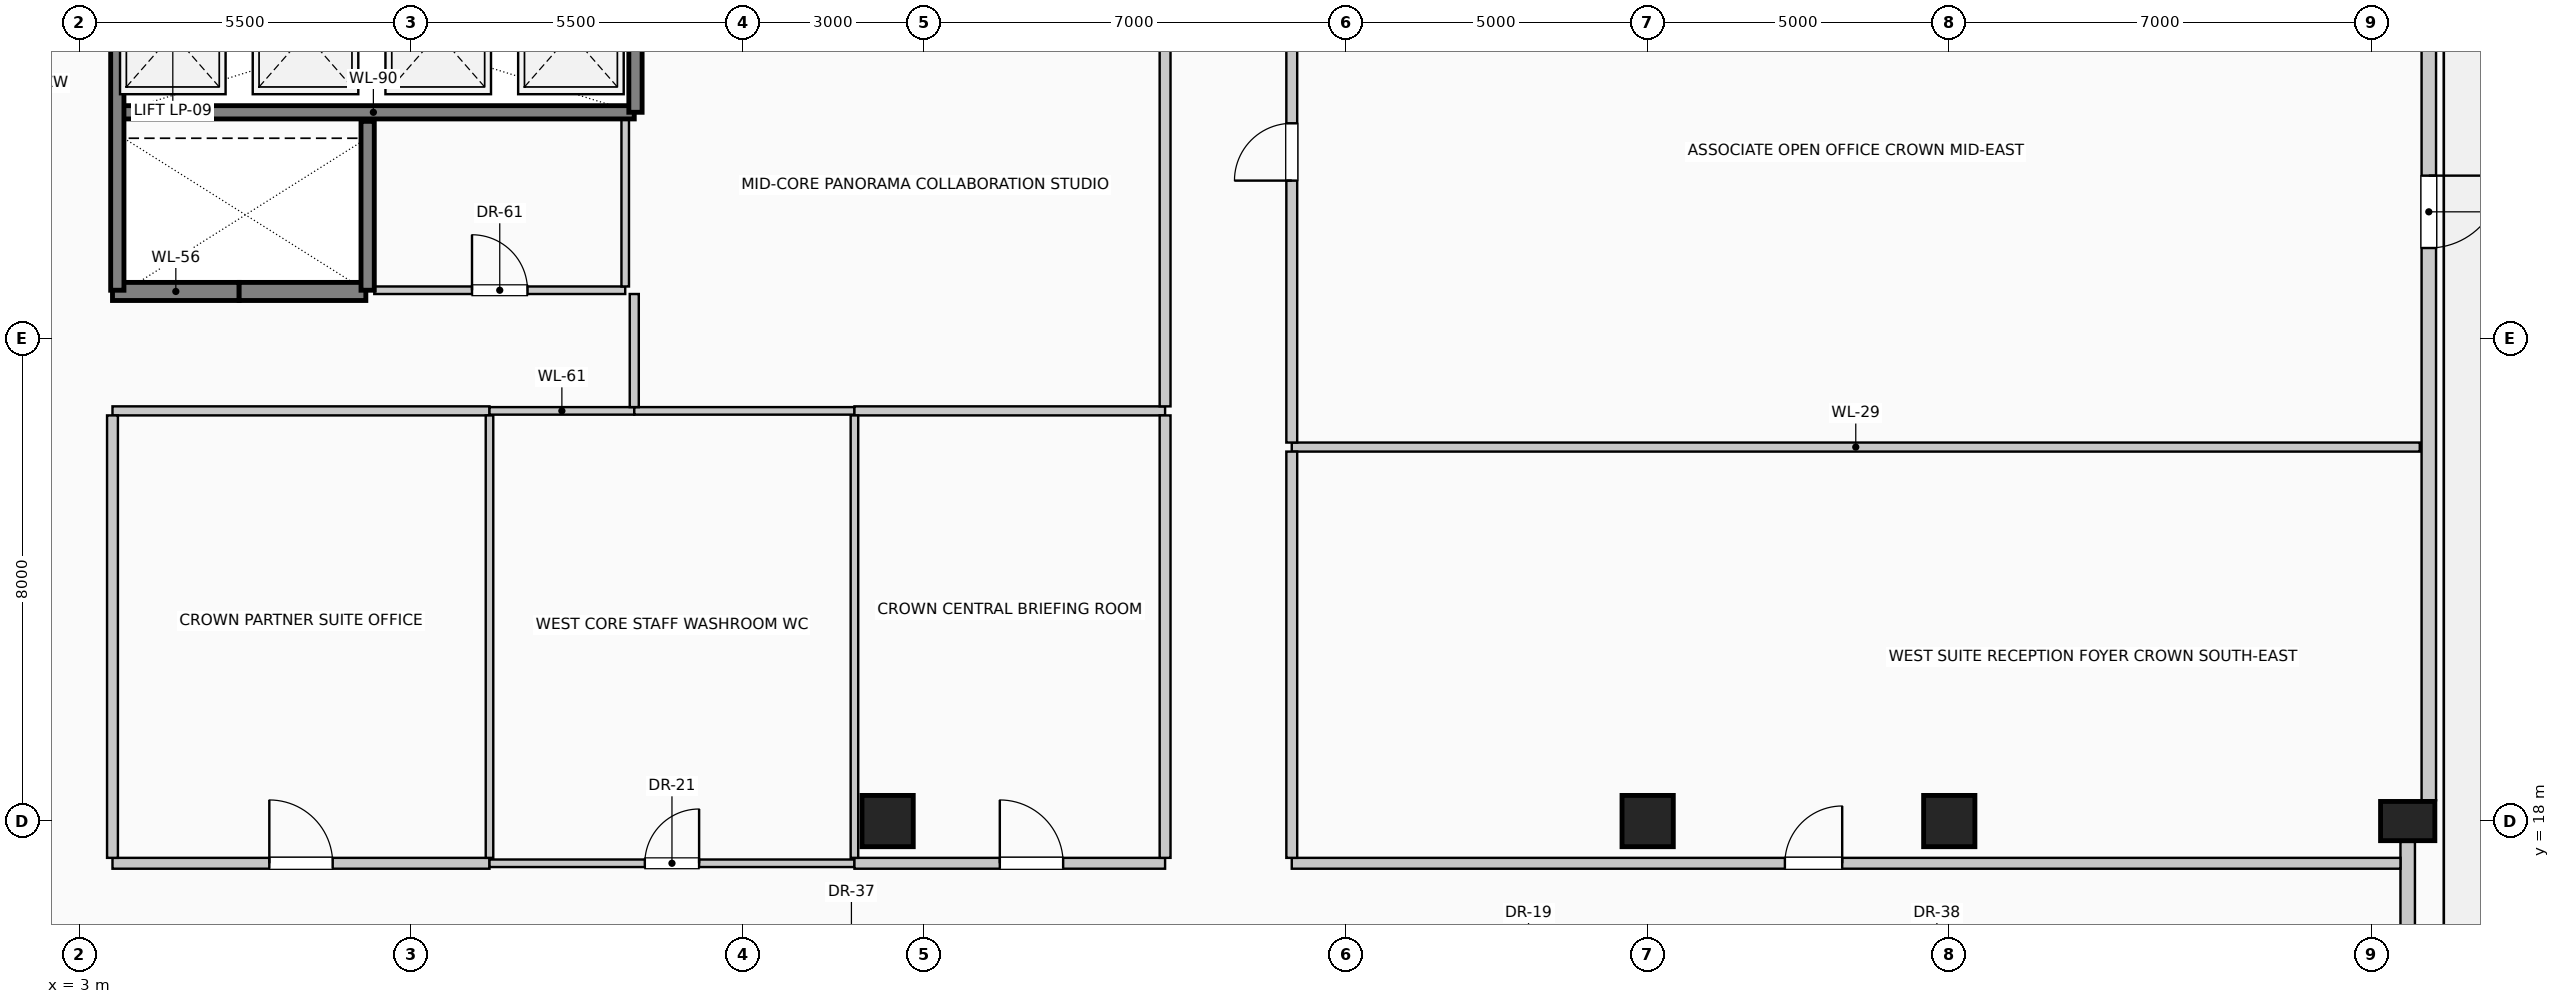
"""IFC4 building model, lengths in metres.
Left out: names, types, materials, properties, quantities, classifications, styles, units other than length and angle.
Written with IfcOpenShell. Run it as: python <this file> out.ifc"""

import sys

from ifc_helpers import new_model, si_unit, direction, frame, frame_2d, origin, origin_2d, place, context, subcontext, project, spatial, rectangle, circle, extrude, element, fill, save


model = new_model("IFC4")
c1 = context("Model", 3, precision=1e-05, world=origin(), true_north=direction((0.0, 1.0)))
c2 = subcontext(c1, "Body", "Model", "MODEL_VIEW")
j1 = project(units=[si_unit("LENGTHUNIT", "METRE"), si_unit("PLANEANGLEUNIT", "RADIAN")], contexts=[c1])
p1 = place(None, origin())
s1 = spatial("IfcSite", under=j1, at=p1, CompositionType="ELEMENT")
p2 = place(p1, origin())
s2 = spatial("IfcBuilding", under=s1, at=p2, CompositionType="ELEMENT")
p3 = place(p2, frame((0.0, 0.0, 297.0)))
s3 = spatial("IfcBuildingStorey", under=s2, at=p3, CompositionType="ELEMENT", Elevation=297.0)
p4 = place(p3, frame((41.6, 18.0, 0.0), z_axis=(0.0, 0.0, 1.0), x_axis=(0.0, 1.0, 0.0)))
e1 = element("IfcColumn", 1, at=p4, inside=s3, PredefinedType="COLUMN", context=c2, shape_type="SweptSolid", body=[
    extrude(rectangle(XDim=0.65, YDim=0.9, at=origin_2d()), origin(), (0.0, 0.0, 1.0), 4.0),
])
for number, where, z_axis, x_axis in (
    (2, (16.4, 18.0, 0.0), (0.0, 0.0, 1.0), (1.0, 0.0, 0.0)),
    (3, (29.0, 18.0, 0.0), (0.0, 0.0, 1.0), (1.0, 0.0, 0.0)),
    (4, (34.0, 18.0, 0.0), (0.0, 0.0, 1.0), (1.0, 0.0, 0.0)),
):
    element("IfcColumn", number, at=place(p3, frame(where, z_axis=z_axis, x_axis=x_axis)), inside=s3, PredefinedType="COLUMN", context=c2, shape_type="SweptSolid", body=[
        extrude(circle(Radius=0.425, at=origin_2d()), origin(), (0.0, 0.0, 1.0), 4.0),
    ])
p5 = place(p3, frame((41.6, 17.655, 0.0), z_axis=(0.0, 0.0, 1.0), x_axis=(0.0, -1.0, 0.0)))
e5 = element("IfcWall", 5, at=p5, inside=s3, PredefinedType="SOLIDWALL", context=c2, shape_type="SweptSolid", body=[
    extrude(rectangle(XDim=13.71, YDim=0.24, at=frame_2d((6.855, 0.0))), origin(), (0.0, 0.0, 1.0), 3.025),
])
p6 = place(p5, frame((3.17, 0.0, 0.35)))
e6 = element("IfcOpeningElement", 6, at=p6, cuts=e5, PredefinedType="OPENING", context=c2, shape_type="SweptSolid", body=[
    extrude(rectangle(XDim=2.1, YDim=2.2, at=frame_2d((1.05, 1.1))), frame((0.0, 0.13, 0.0), z_axis=(0.0, -1.0, 0.0), x_axis=(1.0, 0.0, 0.0)), (0.0, 0.0, 1.0), 0.26),
])
p7 = place(p5, frame((8.44, 0.0, 0.35)))
e7 = element("IfcOpeningElement", 7, at=p7, cuts=e5, PredefinedType="OPENING", context=c2, shape_type="SweptSolid", body=[
    extrude(rectangle(XDim=2.1, YDim=2.2, at=frame_2d((1.05, 1.1))), frame((0.0, 0.13, 0.0), z_axis=(0.0, -1.0, 0.0), x_axis=(1.0, 0.0, 0.0)), (0.0, 0.0, 1.0), 0.26),
])
p8 = place(p3, frame((41.95, 33.655, 0.0), z_axis=(0.0, 0.0, 1.0), x_axis=(0.0, -1.0, 0.0)))
e8 = element("IfcWall", 8, at=p8, inside=s3, PredefinedType="SOLIDWALL", context=c2, shape_type="SweptSolid", body=[
    extrude(rectangle(XDim=15.31, YDim=0.24, at=frame_2d((7.655, 0.0))), origin(), (0.0, 0.0, 1.0), 3.775),
])
p9 = place(p8, frame((4.955, 0.0, 0.0)))
e9 = element("IfcOpeningElement", 9, at=p9, cuts=e8, PredefinedType="OPENING", context=c2, shape_type="SweptSolid", body=[
    extrude(rectangle(XDim=1.2, YDim=2.25, at=frame_2d((0.6, 1.125))), frame((0.0, 0.13, 0.0), z_axis=(0.0, -1.0, 0.0), x_axis=(1.0, 0.0, 0.0)), (0.0, 0.0, 1.0), 0.26),
])
p10 = place(p3, frame((5.65, 26.78, 0.0), z_axis=(0.0, 0.0, 1.0), x_axis=(-1.0, 0.0, 0.0)))
e10 = element("IfcWall", 10, at=p10, inside=s3, PredefinedType="SOLIDWALL", context=c2, shape_type="SweptSolid", body=[
    extrude(rectangle(XDim=2.1, YDim=0.3, at=frame_2d((1.05, 0.0))), origin(), (0.0, 0.0, 1.0), 4.0),
])
p11 = place(p3, frame((7.75, 26.78, 0.0), z_axis=(0.0, 0.0, 1.0), x_axis=(-1.0, 0.0, 0.0)))
e11 = element("IfcWall", 11, at=p11, inside=s3, PredefinedType="SOLIDWALL", context=c2, shape_type="SweptSolid", body=[
    extrude(rectangle(XDim=2.1, YDim=0.3, at=frame_2d((1.05, 0.0))), origin(), (0.0, 0.0, 1.0), 4.0),
])
p12 = place(p3, frame((3.55, 29.75, 0.0), z_axis=(0.0, 0.0, 1.0), x_axis=(1.0, 0.0, 0.0)))
e12 = element("IfcWall", 12, at=p12, inside=s3, PredefinedType="SOLIDWALL", context=c2, shape_type="SweptSolid", body=[
    extrude(rectangle(XDim=8.65, YDim=0.22, at=frame_2d((4.325, 0.0))), origin(), (0.0, 0.0, 1.0), 4.0),
])
p13 = place(p3, frame((3.63, 26.8, 0.0), z_axis=(0.0, 0.0, 1.0), x_axis=(0.0, 1.0, 0.0)))
e13 = element("IfcWall", 13, at=p13, inside=s3, PredefinedType="SOLIDWALL", context=c2, shape_type="SweptSolid", body=[
    extrude(rectangle(XDim=5.55, YDim=0.22, at=frame_2d((2.775, 0.0))), origin(), (0.0, 0.0, 1.0), 4.0),
])
p14 = place(p3, frame((7.78, 26.8, 0.0), z_axis=(0.0, 0.0, 1.0), x_axis=(0.0, 1.0, 0.0)))
e14 = element("IfcWall", 14, at=p14, inside=s3, PredefinedType="SOLIDWALL", context=c2, shape_type="SweptSolid", body=[
    extrude(rectangle(XDim=2.8, YDim=0.22, at=frame_2d((1.4, 0.0))), origin(), (0.0, 0.0, 1.0), 4.0),
])
p15 = place(p3, frame((12.22, 29.75, 0.0), z_axis=(0.0, 0.0, 1.0), x_axis=(0.0, 1.0, 0.0)))
e15 = element("IfcWall", 15, at=p15, inside=s3, PredefinedType="SOLIDWALL", context=c2, shape_type="SweptSolid", body=[
    extrude(rectangle(XDim=2.6, YDim=0.22, at=frame_2d((1.3, 0.0))), origin(), (0.0, 0.0, 1.0), 4.0),
])
p16 = place(p3, frame((3.55, 17.3, 0.0), z_axis=(0.0, 0.0, 1.0), x_axis=(1.0, 0.0, 0.0)))
e16 = element("IfcWall", 16, at=p16, inside=s3, PredefinedType="PARTITIONING", context=c2, shape_type="SweptSolid", body=[
    extrude(rectangle(XDim=6.25, YDim=0.18, at=frame_2d((3.125, 0.0))), origin(), (0.0, 0.0, 1.0), 3.775),
])
p17 = place(p16, frame((2.6, 0.0, 0.0)))
e17 = element("IfcOpeningElement", 17, at=p17, cuts=e16, PredefinedType="OPENING", context=c2, shape_type="SweptSolid", body=[
    extrude(rectangle(XDim=1.05, YDim=2.15, at=frame_2d((0.525, 1.075))), frame((0.0, 0.1, 0.0), z_axis=(0.0, -1.0, 0.0), x_axis=(1.0, 0.0, 0.0)), (0.0, 0.0, 1.0), 0.2),
])
p18 = place(p3, frame((9.8, 17.3, 0.0), z_axis=(0.0, 0.0, 1.0), x_axis=(1.0, 0.0, 0.0)))
e18 = element("IfcWall", 18, at=p18, inside=s3, PredefinedType="PARTITIONING", context=c2, shape_type="SweptSolid", body=[
    extrude(rectangle(XDim=6.05, YDim=0.125, at=frame_2d((3.025, 0.0))), origin(), (0.0, 0.0, 1.0), 3.775),
])
p19 = place(p18, frame((2.575, 0.0, 0.0)))
e19 = element("IfcOpeningElement", 19, at=p19, cuts=e18, PredefinedType="OPENING", context=c2, shape_type="SweptSolid", body=[
    extrude(rectangle(XDim=0.9, YDim=2.1, at=frame_2d((0.45, 1.05))), frame((0.0, 0.073, 0.0), z_axis=(0.0, -1.0, 0.0), x_axis=(1.0, 0.0, 0.0)), (0.0, 0.0, 1.0), 0.145),
])
p20 = place(p3, frame((15.85, 17.3, 0.0), z_axis=(0.0, 0.0, 1.0), x_axis=(1.0, 0.0, 0.0)))
e20 = element("IfcWall", 20, at=p20, inside=s3, PredefinedType="PARTITIONING", context=c2, shape_type="SweptSolid", body=[
    extrude(rectangle(XDim=5.15, YDim=0.18, at=frame_2d((2.575, 0.0))), origin(), (0.0, 0.0, 1.0), 3.775),
])
p21 = place(p20, frame((2.41, 0.0, 0.0)))
e21 = element("IfcOpeningElement", 21, at=p21, cuts=e20, PredefinedType="OPENING", context=c2, shape_type="SweptSolid", body=[
    extrude(rectangle(XDim=1.05, YDim=2.15, at=frame_2d((0.525, 1.075))), frame((0.0, 0.1, 0.0), z_axis=(0.0, -1.0, 0.0), x_axis=(1.0, 0.0, 0.0)), (0.0, 0.0, 1.0), 0.2),
])
p22 = place(p3, frame((23.1, 17.3, 0.0), z_axis=(0.0, 0.0, 1.0), x_axis=(1.0, 0.0, 0.0)))
e22 = element("IfcWall", 22, at=p22, inside=s3, PredefinedType="PARTITIONING", context=c2, shape_type="SweptSolid", body=[
    extrude(rectangle(XDim=18.38, YDim=0.18, at=frame_2d((9.19, 0.0))), origin(), (0.0, 0.0, 1.0), 3.775),
])
p23 = place(p22, frame((8.175, 0.0, 0.0)))
e23 = element("IfcOpeningElement", 23, at=p23, cuts=e22, PredefinedType="OPENING", context=c2, shape_type="SweptSolid", body=[
    extrude(rectangle(XDim=0.95, YDim=2.15, at=frame_2d((0.475, 1.075))), frame((0.0, 0.1, 0.0), z_axis=(0.0, -1.0, 0.0), x_axis=(1.0, 0.0, 0.0)), (0.0, 0.0, 1.0), 0.2),
])
p24 = place(p3, frame((23.1, 24.2, 0.0), z_axis=(0.0, 0.0, 1.0), x_axis=(1.0, 0.0, 0.0)))
e24 = element("IfcWall", 24, at=p24, inside=s3, PredefinedType="PARTITIONING", context=c2, shape_type="SweptSolid", body=[
    extrude(rectangle(XDim=18.7, YDim=0.15, at=frame_2d((9.35, 0.0))), origin(), (0.0, 0.0, 1.0), 3.775),
])
p25 = place(p3, frame((3.55, 24.8, 0.0), z_axis=(0.0, 0.0, 1.0), x_axis=(1.0, 0.0, 0.0)))
e25 = element("IfcWall", 25, at=p25, inside=s3, PredefinedType="PARTITIONING", context=c2, shape_type="SweptSolid", body=[
    extrude(rectangle(XDim=6.25, YDim=0.15, at=frame_2d((3.125, 0.0))), origin(), (0.0, 0.0, 1.0), 3.775),
])
p26 = place(p3, frame((9.8, 24.8, 0.0), z_axis=(0.0, 0.0, 1.0), x_axis=(1.0, 0.0, 0.0)))
e26 = element("IfcWall", 26, at=p26, inside=s3, PredefinedType="PARTITIONING", context=c2, shape_type="SweptSolid", body=[
    extrude(rectangle(XDim=2.4, YDim=0.125, at=frame_2d((1.2, 0.0))), origin(), (0.0, 0.0, 1.0), 3.775),
])
p27 = place(p3, frame((12.2, 24.8, 0.0), z_axis=(0.0, 0.0, 1.0), x_axis=(1.0, 0.0, 0.0)))
e27 = element("IfcWall", 27, at=p27, inside=s3, PredefinedType="PARTITIONING", context=c2, shape_type="SweptSolid", body=[
    extrude(rectangle(XDim=3.65, YDim=0.125, at=frame_2d((1.825, 0.0))), origin(), (0.0, 0.0, 1.0), 3.775),
])
p28 = place(p3, frame((15.85, 24.8, 0.0), z_axis=(0.0, 0.0, 1.0), x_axis=(1.0, 0.0, 0.0)))
e28 = element("IfcWall", 28, at=p28, inside=s3, PredefinedType="PARTITIONING", context=c2, shape_type="SweptSolid", body=[
    extrude(rectangle(XDim=5.15, YDim=0.15, at=frame_2d((2.575, 0.0))), origin(), (0.0, 0.0, 1.0), 3.775),
])
p29 = place(p3, frame((7.89, 26.8, 0.0), z_axis=(0.0, 0.0, 1.0), x_axis=(1.0, 0.0, 0.0)))
e29 = element("IfcWall", 29, at=p29, inside=s3, PredefinedType="PARTITIONING", context=c2, shape_type="SweptSolid", body=[
    extrude(rectangle(XDim=4.16, YDim=0.125, at=frame_2d((2.08, 0.0))), origin(), (0.0, 0.0, 1.0), 3.775),
])
p30 = place(p29, frame((1.62, 0.0, 0.0)))
e30 = element("IfcOpeningElement", 30, at=p30, cuts=e29, PredefinedType="OPENING", context=c2, shape_type="SweptSolid", body=[
    extrude(rectangle(XDim=0.92, YDim=2.1, at=frame_2d((0.46, 1.05))), frame((0.0, 0.073, 0.0), z_axis=(0.0, -1.0, 0.0), x_axis=(1.0, 0.0, 0.0)), (0.0, 0.0, 1.0), 0.145),
])
p31 = place(p3, frame((3.55, 17.39, 0.0), z_axis=(0.0, 0.0, 1.0), x_axis=(0.0, 1.0, 0.0)))
e31 = element("IfcWall", 31, at=p31, inside=s3, PredefinedType="PARTITIONING", context=c2, shape_type="SweptSolid", body=[
    extrude(rectangle(XDim=7.335, YDim=0.18, at=frame_2d((3.667, 0.0))), origin(), (0.0, 0.0, 1.0), 3.775),
])
p32 = place(p3, frame((9.8, 17.39, 0.0), z_axis=(0.0, 0.0, 1.0), x_axis=(0.0, 1.0, 0.0)))
e32 = element("IfcWall", 32, at=p32, inside=s3, PredefinedType="PARTITIONING", context=c2, shape_type="SweptSolid", body=[
    extrude(rectangle(XDim=7.335, YDim=0.125, at=frame_2d((3.667, 0.0))), origin(), (0.0, 0.0, 1.0), 3.775),
])
p33 = place(p3, frame((12.05, 26.863, 0.0), z_axis=(0.0, 0.0, 1.0), x_axis=(0.0, 1.0, 0.0)))
e33 = element("IfcWall", 33, at=p33, inside=s3, PredefinedType="PARTITIONING", context=c2, shape_type="SweptSolid", body=[
    extrude(rectangle(XDim=2.777, YDim=0.125, at=frame_2d((1.389, 0.0))), origin(), (0.0, 0.0, 1.0), 3.775),
])
p34 = place(p3, frame((12.2, 24.863, 0.0), z_axis=(0.0, 0.0, 1.0), x_axis=(0.0, 1.0, 0.0)))
e34 = element("IfcWall", 34, at=p34, inside=s3, PredefinedType="PARTITIONING", context=c2, shape_type="SweptSolid", body=[
    extrude(rectangle(XDim=1.875, YDim=0.15, at=frame_2d((0.938, 0.0))), origin(), (0.0, 0.0, 1.0), 3.775),
])
p35 = place(p3, frame((15.85, 17.39, 0.0), z_axis=(0.0, 0.0, 1.0), x_axis=(0.0, 1.0, 0.0)))
e35 = element("IfcWall", 35, at=p35, inside=s3, PredefinedType="PARTITIONING", context=c2, shape_type="SweptSolid", body=[
    extrude(rectangle(XDim=7.335, YDim=0.125, at=frame_2d((3.667, 0.0))), origin(), (0.0, 0.0, 1.0), 3.775),
])
p36 = place(p3, frame((21.0, 17.39, 0.0), z_axis=(0.0, 0.0, 1.0), x_axis=(0.0, 1.0, 0.0)))
e36 = element("IfcWall", 36, at=p36, inside=s3, PredefinedType="PARTITIONING", context=c2, shape_type="SweptSolid", body=[
    extrude(rectangle(XDim=7.335, YDim=0.18, at=frame_2d((3.667, 0.0))), origin(), (0.0, 0.0, 1.0), 3.775),
])
p37 = place(p3, frame((21.0, 24.875, 0.0), z_axis=(0.0, 0.0, 1.0), x_axis=(0.0, 1.0, 0.0)))
e37 = element("IfcWall", 37, at=p37, inside=s3, PredefinedType="PARTITIONING", context=c2, shape_type="SweptSolid", body=[
    extrude(rectangle(XDim=7.385, YDim=0.18, at=frame_2d((3.692, 0.0))), origin(), (0.0, 0.0, 1.0), 3.775),
])
p38 = place(p3, frame((23.1, 17.39, 0.0), z_axis=(0.0, 0.0, 1.0), x_axis=(0.0, 1.0, 0.0)))
e38 = element("IfcWall", 38, at=p38, inside=s3, PredefinedType="PARTITIONING", context=c2, shape_type="SweptSolid", body=[
    extrude(rectangle(XDim=6.735, YDim=0.18, at=frame_2d((3.368, 0.0))), origin(), (0.0, 0.0, 1.0), 3.775),
])
p39 = place(p3, frame((23.1, 24.275, 0.0), z_axis=(0.0, 0.0, 1.0), x_axis=(0.0, 1.0, 0.0)))
e39 = element("IfcWall", 39, at=p39, inside=s3, PredefinedType="PARTITIONING", context=c2, shape_type="SweptSolid", body=[
    extrude(rectangle(XDim=9.635, YDim=0.18, at=frame_2d((4.817, 0.0))), origin(), (0.0, 0.0, 1.0), 3.775),
])
p40 = place(p39, frame((4.343, 0.0, 0.0)))
e40 = element("IfcOpeningElement", 40, at=p40, cuts=e39, PredefinedType="OPENING", context=c2, shape_type="SweptSolid", body=[
    extrude(rectangle(XDim=0.95, YDim=2.15, at=frame_2d((0.475, 1.075))), frame((0.0, 0.1, 0.0), z_axis=(0.0, -1.0, 0.0), x_axis=(1.0, 0.0, 0.0)), (0.0, 0.0, 1.0), 0.2),
])
p41 = place(p9, origin())
e41 = element("IfcDoor", 41, at=p41, inside=s3, OperationType="SINGLE_SWING_LEFT", PredefinedType="DOOR", context=c2, shape_type="SweptSolid", body=[
    extrude(rectangle(XDim=1.2, YDim=2.25, at=frame_2d((0.6, 1.125))), frame((0.0, 0.025, 0.0), z_axis=(0.0, -1.0, 0.0), x_axis=(1.0, 0.0, 0.0)), (0.0, 0.0, 1.0), 0.05),
])
fill(e9, e41)
p42 = place(p17, origin())
e42 = element("IfcDoor", 42, at=p42, inside=s3, OperationType="SINGLE_SWING_LEFT", PredefinedType="DOOR", context=c2, shape_type="SweptSolid", body=[
    extrude(rectangle(XDim=1.05, YDim=2.15, at=frame_2d((0.525, 1.075))), frame((0.0, 0.025, 0.0), z_axis=(0.0, -1.0, 0.0), x_axis=(1.0, 0.0, 0.0)), (0.0, 0.0, 1.0), 0.05),
])
fill(e17, e42)
p43 = place(p19, origin())
e43 = element("IfcDoor", 43, at=p43, inside=s3, OperationType="SINGLE_SWING_RIGHT", PredefinedType="DOOR", context=c2, shape_type="SweptSolid", body=[
    extrude(rectangle(XDim=0.9, YDim=2.1, at=frame_2d((0.45, 1.05))), frame((0.0, 0.025, 0.0), z_axis=(0.0, -1.0, 0.0), x_axis=(1.0, 0.0, 0.0)), (0.0, 0.0, 1.0), 0.05),
])
fill(e19, e43)
p44 = place(p21, origin())
e44 = element("IfcDoor", 44, at=p44, inside=s3, OperationType="SINGLE_SWING_LEFT", PredefinedType="DOOR", context=c2, shape_type="SweptSolid", body=[
    extrude(rectangle(XDim=1.05, YDim=2.15, at=frame_2d((0.525, 1.075))), frame((0.0, 0.025, 0.0), z_axis=(0.0, -1.0, 0.0), x_axis=(1.0, 0.0, 0.0)), (0.0, 0.0, 1.0), 0.05),
])
fill(e21, e44)
p45 = place(p23, origin())
e45 = element("IfcDoor", 45, at=p45, inside=s3, OperationType="SINGLE_SWING_RIGHT", PredefinedType="DOOR", context=c2, shape_type="SweptSolid", body=[
    extrude(rectangle(XDim=0.95, YDim=2.15, at=frame_2d((0.475, 1.075))), frame((0.0, 0.025, 0.0), z_axis=(0.0, -1.0, 0.0), x_axis=(1.0, 0.0, 0.0)), (0.0, 0.0, 1.0), 0.05),
])
fill(e23, e45)
p46 = place(p30, origin())
e46 = element("IfcDoor", 46, at=p46, inside=s3, OperationType="SINGLE_SWING_LEFT", PredefinedType="DOOR", context=c2, shape_type="SweptSolid", body=[
    extrude(rectangle(XDim=0.92, YDim=2.1, at=frame_2d((0.46, 1.05))), frame((0.0, 0.025, 0.0), z_axis=(0.0, -1.0, 0.0), x_axis=(1.0, 0.0, 0.0)), (0.0, 0.0, 1.0), 0.05),
])
fill(e30, e46)
p47 = place(p40, origin())
e47 = element("IfcDoor", 47, at=p47, inside=s3, OperationType="SINGLE_SWING_LEFT", PredefinedType="DOOR", context=c2, shape_type="SweptSolid", body=[
    extrude(rectangle(XDim=0.95, YDim=2.15, at=frame_2d((0.475, 1.075))), frame((0.0, 0.025, 0.0), z_axis=(0.0, -1.0, 0.0), x_axis=(1.0, 0.0, 0.0)), (0.0, 0.0, 1.0), 0.05),
])
fill(e40, e47)
save(model, sys.argv[1])
